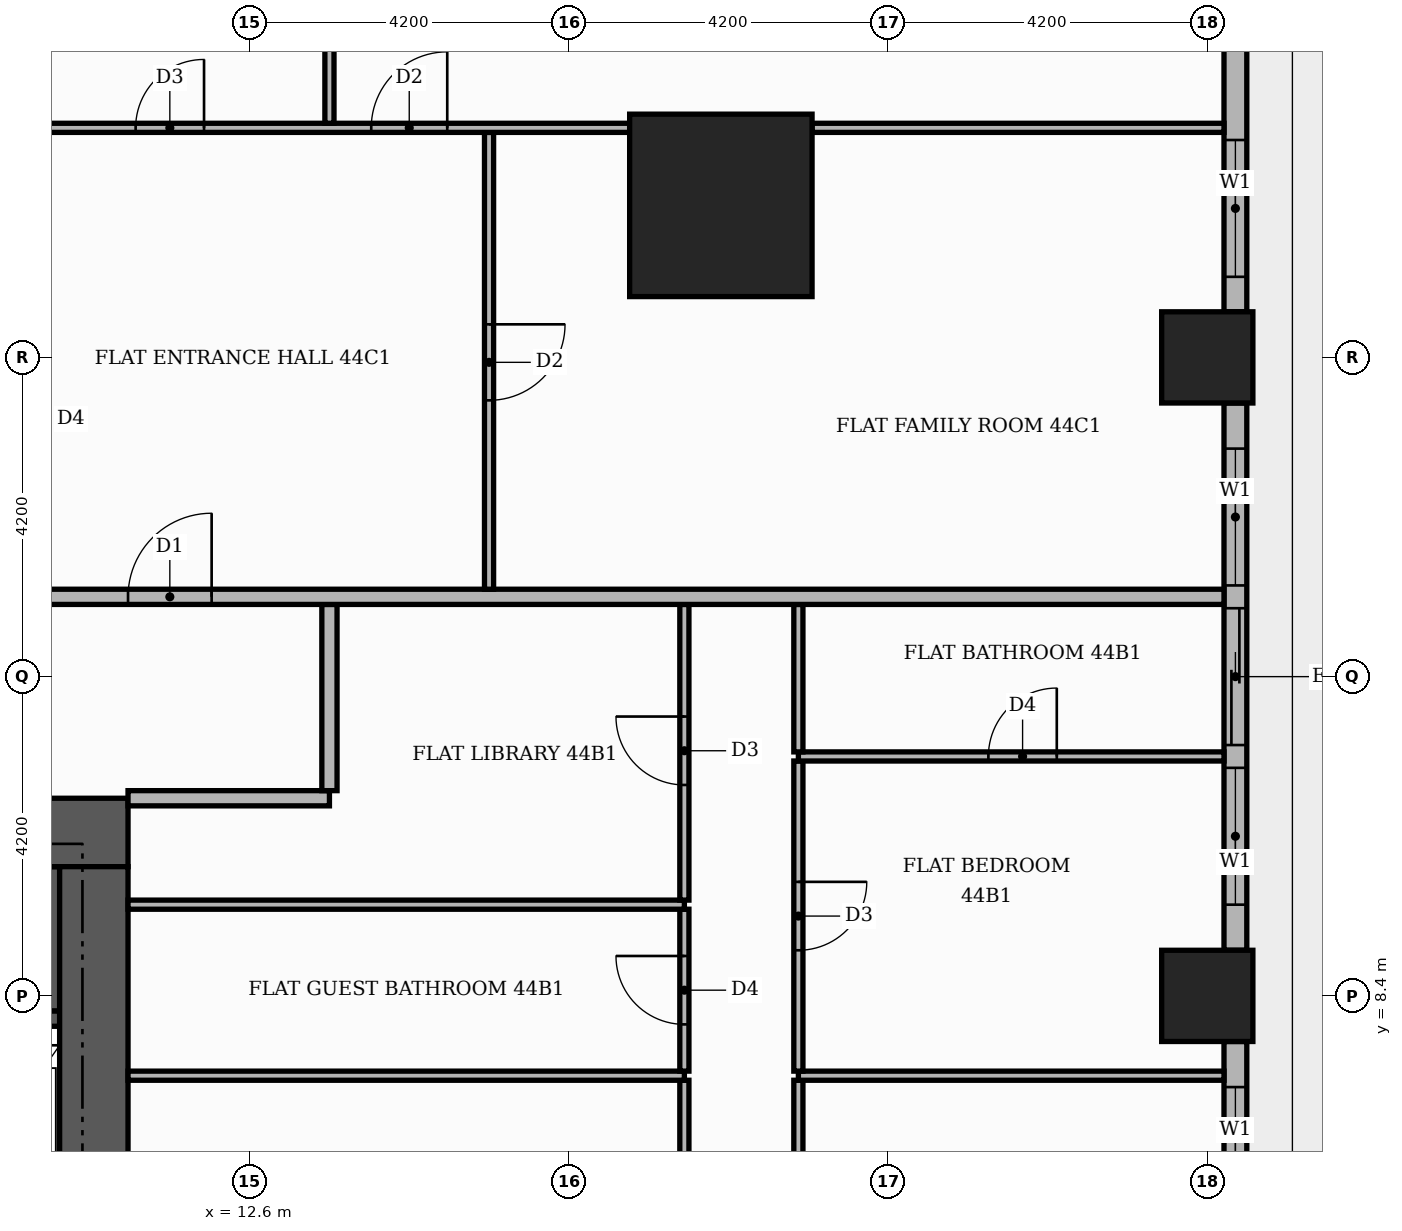
"""IFC4 building model, lengths in metres.
Left out: names, types, materials, properties, quantities, classifications, styles, units other than length and angle.
Written with IfcOpenShell. Run it as: python <this file> out.ifc"""

import sys

from ifc_helpers import new_model, si_unit, direction, frame, frame_2d, origin, origin_2d, place, context, subcontext, project, spatial, rectangle, extrude, element, fill, save


model = new_model("IFC4")
c1 = context("Model", 3, precision=1e-05, world=origin(), true_north=direction((0.0, 1.0)))
c2 = subcontext(c1, "Body", "Model", "MODEL_VIEW")
j1 = project(units=[si_unit("LENGTHUNIT", "METRE"), si_unit("PLANEANGLEUNIT", "RADIAN")], contexts=[c1])
p1 = place(None, origin())
s1 = spatial("IfcSite", under=j1, at=p1, CompositionType="ELEMENT")
p2 = place(p1, origin())
s2 = spatial("IfcBuilding", under=s1, at=p2, CompositionType="ELEMENT")
p3 = place(p2, frame((0.0, 0.0, 188.4)))
s3 = spatial("IfcBuildingStorey", under=s2, at=p3, CompositionType="ELEMENT", Elevation=188.4)
p4 = place(p3, frame((5.5, 9.15, 0.0), z_axis=(0.0, 0.0, 1.0), x_axis=(1.0, 0.0, 0.0)))
e1 = element("IfcWall", 1, at=p4, inside=s3, PredefinedType="SHEAR", context=c2, shape_type="SweptSolid", body=[
    extrude(rectangle(XDim=4.6, YDim=1.9, at=frame_2d((2.3, 0.0))), origin(), (0.0, 0.0, 1.0), 3.48),
])
p5 = place(p3, frame((8.1, 8.1, 0.0), z_axis=(0.0, 0.0, 1.0), x_axis=(1.0, 0.0, 0.0)))
e2 = element("IfcWall", 2, at=p5, inside=s3, PredefinedType="SHEAR", context=c2, shape_type="SweptSolid", body=[
    extrude(rectangle(XDim=2.0, YDim=0.2, at=frame_2d((1.0, 0.0))), origin(), (0.0, 0.0, 1.0), 3.48),
])
p6 = place(p3, frame((-11.0, 10.55, 0.0), z_axis=(0.0, 0.0, 1.0), x_axis=(1.0, 0.0, 0.0)))
e3 = element("IfcWall", 3, at=p6, inside=s3, PredefinedType="SHEAR", context=c2, shape_type="SweptSolid", body=[
    extrude(rectangle(XDim=22.0, YDim=0.9, at=frame_2d((11.0, 0.0))), origin(), (0.0, 0.0, 1.0), 3.48),
])
p7 = place(p6, frame((13.3, 0.0, 0.0)))
e4 = element("IfcOpeningElement", 4, at=p7, cuts=e3, PredefinedType="OPENING", context=c2, shape_type="SweptSolid", body=[
    extrude(rectangle(XDim=1.8, YDim=2.2, at=frame_2d((0.9, 1.1))), frame((0.0, 0.46, 0.0), z_axis=(0.0, -1.0, 0.0), x_axis=(1.0, 0.0, 0.0)), (0.0, 0.0, 1.0), 0.92),
])
p8 = place(p3, frame((10.55, -10.1, 0.0), z_axis=(0.0, 0.0, 1.0), x_axis=(0.0, 1.0, 0.0)))
e5 = element("IfcWall", 5, at=p8, inside=s3, PredefinedType="SHEAR", context=c2, shape_type="SweptSolid", body=[
    extrude(rectangle(XDim=20.2, YDim=0.9, at=frame_2d((10.1, 0.0))), origin(), (0.0, 0.0, 1.0), 3.48),
])
p9 = place(p3, frame((18.8, 18.8, 0.0), z_axis=(0.0, 0.0, 1.0), x_axis=(1.0, 0.0, 0.0)))
e6 = element("IfcColumn", 6, at=p9, inside=s3, PredefinedType="COLUMN", context=c2, shape_type="SweptSolid", body=[
    extrude(rectangle(XDim=2.4, YDim=2.4, at=origin_2d()), origin(), (0.0, 0.0, 1.0), 3.9),
])
for number, where, z_axis, x_axis in (
    (7, (25.2, 8.4, 0.0), (0.0, 0.0, 1.0), (1.0, 0.0, 0.0)),
    (8, (25.2, 16.8, 0.0), (0.0, 0.0, 1.0), (1.0, 0.0, 0.0)),
):
    element("IfcColumn", number, at=place(p3, frame(where, z_axis=z_axis, x_axis=x_axis)), inside=s3, PredefinedType="COLUMN", context=c2, shape_type="SweptSolid", body=[
        extrude(rectangle(XDim=1.2, YDim=1.2, at=origin_2d()), origin(), (0.0, 0.0, 1.0), 3.9),
    ])
p10 = place(p3, frame((25.57, 3.45, 0.0), z_axis=(0.0, 0.0, 1.0), x_axis=(0.0, 1.0, 0.0)))
e9 = element("IfcWall", 9, at=p10, inside=s3, PredefinedType="STANDARD", context=c2, shape_type="SweptSolid", body=[
    extrude(rectangle(XDim=4.35, YDim=0.3, at=frame_2d((2.175, 0.0))), origin(), (0.0, 0.0, 1.0), 3.48),
])
p11 = place(p10, frame((1.95, 0.0, 0.9)))
e10 = element("IfcOpeningElement", 10, at=p11, cuts=e9, PredefinedType="OPENING", context=c2, shape_type="SweptSolid", body=[
    extrude(rectangle(XDim=1.8, YDim=2.1, at=frame_2d((0.9, 1.05))), frame((0.0, 0.16, 0.0), z_axis=(0.0, -1.0, 0.0), x_axis=(1.0, 0.0, 0.0)), (0.0, 0.0, 1.0), 0.32),
])
p12 = place(p3, frame((25.57, 9.0, 0.0), z_axis=(0.0, 0.0, 1.0), x_axis=(0.0, 1.0, 0.0)))
e11 = element("IfcWall", 11, at=p12, inside=s3, PredefinedType="STANDARD", context=c2, shape_type="SweptSolid", body=[
    extrude(rectangle(XDim=7.2, YDim=0.3, at=frame_2d((3.6, 0.0))), origin(), (0.0, 0.0, 1.0), 3.48),
])
p13 = place(p12, frame((0.6, 0.0, 0.9)))
e12 = element("IfcOpeningElement", 12, at=p13, cuts=e11, PredefinedType="OPENING", context=c2, shape_type="SweptSolid", body=[
    extrude(rectangle(XDim=1.8, YDim=2.1, at=frame_2d((0.9, 1.05))), frame((0.0, 0.16, 0.0), z_axis=(0.0, -1.0, 0.0), x_axis=(1.0, 0.0, 0.0)), (0.0, 0.0, 1.0), 0.32),
])
p14 = place(p12, frame((2.7, 0.0, 0.0)))
e13 = element("IfcOpeningElement", 13, at=p14, cuts=e11, PredefinedType="OPENING", context=c2, shape_type="SweptSolid", body=[
    extrude(rectangle(XDim=1.8, YDim=2.4, at=frame_2d((0.9, 1.2))), frame((0.0, 0.16, 0.0), z_axis=(0.0, -1.0, 0.0), x_axis=(1.0, 0.0, 0.0)), (0.0, 0.0, 1.0), 0.32),
])
p15 = place(p12, frame((4.8, 0.0, 0.9)))
e14 = element("IfcOpeningElement", 14, at=p15, cuts=e11, PredefinedType="OPENING", context=c2, shape_type="SweptSolid", body=[
    extrude(rectangle(XDim=1.8, YDim=2.1, at=frame_2d((0.9, 1.05))), frame((0.0, 0.16, 0.0), z_axis=(0.0, -1.0, 0.0), x_axis=(1.0, 0.0, 0.0)), (0.0, 0.0, 1.0), 0.32),
])
p16 = place(p3, frame((25.57, 17.4, 0.0), z_axis=(0.0, 0.0, 1.0), x_axis=(0.0, 1.0, 0.0)))
e15 = element("IfcWall", 15, at=p16, inside=s3, PredefinedType="STANDARD", context=c2, shape_type="SweptSolid", body=[
    extrude(rectangle(XDim=3.82, YDim=0.3, at=frame_2d((1.91, 0.0))), origin(), (0.0, 0.0, 1.0), 3.48),
])
p17 = place(p16, frame((0.46, 0.0, 0.9)))
e16 = element("IfcOpeningElement", 16, at=p17, cuts=e15, PredefinedType="OPENING", context=c2, shape_type="SweptSolid", body=[
    extrude(rectangle(XDim=1.8, YDim=2.1, at=frame_2d((0.9, 1.05))), frame((0.0, 0.16, 0.0), z_axis=(0.0, -1.0, 0.0), x_axis=(1.0, 0.0, 0.0)), (0.0, 0.0, 1.0), 0.32),
])
p18 = place(p3, frame((18.32, 3.21, 0.0), z_axis=(0.0, 0.0, 1.0), x_axis=(0.0, 1.0, 0.0)))
e17 = element("IfcWall", 17, at=p18, inside=s3, PredefinedType="PARTITIONING", context=c2, shape_type="SweptSolid", body=[
    extrude(rectangle(XDim=4.08, YDim=0.12, at=frame_2d((2.04, 0.0))), origin(), (0.0, 0.0, 1.0), 3.48),
])
p19 = place(p18, frame((1.59, 0.0, 0.0)))
e18 = element("IfcOpeningElement", 18, at=p19, cuts=e17, PredefinedType="OPENING", context=c2, shape_type="SweptSolid", body=[
    extrude(rectangle(XDim=0.9, YDim=2.1, at=frame_2d((0.45, 1.05))), frame((0.0, 0.07, 0.0), z_axis=(0.0, -1.0, 0.0), x_axis=(1.0, 0.0, 0.0)), (0.0, 0.0, 1.0), 0.14),
])
p20 = place(p3, frame((19.82, 3.21, 0.0), z_axis=(0.0, 0.0, 1.0), x_axis=(0.0, 1.0, 0.0)))
e19 = element("IfcWall", 19, at=p20, inside=s3, PredefinedType="PARTITIONING", context=c2, shape_type="SweptSolid", body=[
    extrude(rectangle(XDim=4.08, YDim=0.12, at=frame_2d((2.04, 0.0))), origin(), (0.0, 0.0, 1.0), 3.48),
])
p21 = place(p20, frame((1.59, 0.0, 0.0)))
e20 = element("IfcOpeningElement", 20, at=p21, cuts=e19, PredefinedType="OPENING", context=c2, shape_type="SweptSolid", body=[
    extrude(rectangle(XDim=0.9, YDim=2.1, at=frame_2d((0.45, 1.05))), frame((0.0, 0.07, 0.0), z_axis=(0.0, -1.0, 0.0), x_axis=(1.0, 0.0, 0.0)), (0.0, 0.0, 1.0), 0.14),
])
p22 = place(p3, frame((11.0, 7.35, 0.0), z_axis=(0.0, 0.0, 1.0), x_axis=(1.0, 0.0, 0.0)))
e21 = element("IfcWall", 21, at=p22, inside=s3, PredefinedType="PARTITIONING", context=c2, shape_type="SweptSolid", body=[
    extrude(rectangle(XDim=7.32, YDim=0.12, at=frame_2d((3.66, 0.0))), origin(), (0.0, 0.0, 1.0), 3.48),
])
p23 = place(p3, frame((19.82, 7.35, 0.0), z_axis=(0.0, 0.0, 1.0), x_axis=(1.0, 0.0, 0.0)))
e22 = element("IfcWall", 22, at=p23, inside=s3, PredefinedType="PARTITIONING", context=c2, shape_type="SweptSolid", body=[
    extrude(rectangle(XDim=5.6, YDim=0.12, at=frame_2d((2.8, 0.0))), origin(), (0.0, 0.0, 1.0), 3.48),
])
p24 = place(p3, frame((18.32, 7.41, 0.0), z_axis=(0.0, 0.0, 1.0), x_axis=(0.0, 1.0, 0.0)))
e23 = element("IfcWall", 23, at=p24, inside=s3, PredefinedType="PARTITIONING", context=c2, shape_type="SweptSolid", body=[
    extrude(rectangle(XDim=2.13, YDim=0.12, at=frame_2d((1.065, 0.0))), origin(), (0.0, 0.0, 1.0), 3.48),
])
p25 = place(p24, frame((0.615, 0.0, 0.0)))
e24 = element("IfcOpeningElement", 24, at=p25, cuts=e23, PredefinedType="OPENING", context=c2, shape_type="SweptSolid", body=[
    extrude(rectangle(XDim=0.9, YDim=2.1, at=frame_2d((0.45, 1.05))), frame((0.0, 0.07, 0.0), z_axis=(0.0, -1.0, 0.0), x_axis=(1.0, 0.0, 0.0)), (0.0, 0.0, 1.0), 0.14),
])
p26 = place(p3, frame((19.82, 7.41, 0.0), z_axis=(0.0, 0.0, 1.0), x_axis=(0.0, 1.0, 0.0)))
e25 = element("IfcWall", 25, at=p26, inside=s3, PredefinedType="PARTITIONING", context=c2, shape_type="SweptSolid", body=[
    extrude(rectangle(XDim=4.08, YDim=0.12, at=frame_2d((2.04, 0.0))), origin(), (0.0, 0.0, 1.0), 3.48),
])
p27 = place(p26, frame((1.59, 0.0, 0.0)))
e26 = element("IfcOpeningElement", 26, at=p27, cuts=e25, PredefinedType="OPENING", context=c2, shape_type="SweptSolid", body=[
    extrude(rectangle(XDim=0.9, YDim=2.1, at=frame_2d((0.45, 1.05))), frame((0.0, 0.07, 0.0), z_axis=(0.0, -1.0, 0.0), x_axis=(1.0, 0.0, 0.0)), (0.0, 0.0, 1.0), 0.14),
])
p28 = place(p3, frame((11.0, 9.6, 0.0), z_axis=(0.0, 0.0, 1.0), x_axis=(1.0, 0.0, 0.0)))
e27 = element("IfcWall", 27, at=p28, inside=s3, PredefinedType="PARTITIONING", context=c2, shape_type="SweptSolid", body=[
    extrude(rectangle(XDim=7.32, YDim=0.12, at=frame_2d((3.66, 0.0))), origin(), (0.0, 0.0, 1.0), 3.48),
])
p29 = place(p3, frame((18.32, 9.66, 0.0), z_axis=(0.0, 0.0, 1.0), x_axis=(0.0, 1.0, 0.0)))
e28 = element("IfcWall", 28, at=p29, inside=s3, PredefinedType="PARTITIONING", context=c2, shape_type="SweptSolid", body=[
    extrude(rectangle(XDim=3.89, YDim=0.12, at=frame_2d((1.945, 0.0))), origin(), (0.0, 0.0, 1.0), 3.48),
])
p30 = place(p29, frame((1.515, 0.0, 0.0)))
e29 = element("IfcOpeningElement", 29, at=p30, cuts=e28, PredefinedType="OPENING", context=c2, shape_type="SweptSolid", body=[
    extrude(rectangle(XDim=0.9, YDim=2.1, at=frame_2d((0.45, 1.05))), frame((0.0, 0.07, 0.0), z_axis=(0.0, -1.0, 0.0), x_axis=(1.0, 0.0, 0.0)), (0.0, 0.0, 1.0), 0.14),
])
p31 = place(p3, frame((11.0, 11.0, 0.0), z_axis=(0.0, 0.0, 1.0), x_axis=(1.0, 0.0, 0.0)))
e30 = element("IfcWall", 30, at=p31, inside=s3, PredefinedType="PARTITIONING", context=c2, shape_type="SweptSolid", body=[
    extrude(rectangle(XDim=2.65, YDim=0.2, at=frame_2d((1.325, 0.0))), origin(), (0.0, 0.0, 1.0), 3.48),
])
p32 = place(p3, frame((13.65, 11.1, 0.0), z_axis=(0.0, 0.0, 1.0), x_axis=(0.0, 1.0, 0.0)))
e31 = element("IfcWall", 31, at=p32, inside=s3, PredefinedType="PARTITIONING", context=c2, shape_type="SweptSolid", body=[
    extrude(rectangle(XDim=2.45, YDim=0.2, at=frame_2d((1.225, 0.0))), origin(), (0.0, 0.0, 1.0), 3.48),
])
p33 = place(p3, frame((19.82, 11.55, 0.0), z_axis=(0.0, 0.0, 1.0), x_axis=(1.0, 0.0, 0.0)))
e32 = element("IfcWall", 32, at=p33, inside=s3, PredefinedType="PARTITIONING", context=c2, shape_type="SweptSolid", body=[
    extrude(rectangle(XDim=5.6, YDim=0.12, at=frame_2d((2.8, 0.0))), origin(), (0.0, 0.0, 1.0), 3.48),
])
p34 = place(p33, frame((2.5, 0.0, 0.0)))
e33 = element("IfcOpeningElement", 33, at=p34, cuts=e32, PredefinedType="OPENING", context=c2, shape_type="SweptSolid", body=[
    extrude(rectangle(XDim=0.9, YDim=2.1, at=frame_2d((0.45, 1.05))), frame((0.0, 0.07, 0.0), z_axis=(0.0, -1.0, 0.0), x_axis=(1.0, 0.0, 0.0)), (0.0, 0.0, 1.0), 0.14),
])
p35 = place(p3, frame((19.82, 11.61, 0.0), z_axis=(0.0, 0.0, 1.0), x_axis=(0.0, 1.0, 0.0)))
e34 = element("IfcWall", 34, at=p35, inside=s3, PredefinedType="PARTITIONING", context=c2, shape_type="SweptSolid", body=[
    extrude(rectangle(XDim=1.94, YDim=0.12, at=frame_2d((0.97, 0.0))), origin(), (0.0, 0.0, 1.0), 3.48),
])
p36 = place(p3, frame((-13.65, 13.65, 0.0), z_axis=(0.0, 0.0, 1.0), x_axis=(1.0, 0.0, 0.0)))
e35 = element("IfcWall", 35, at=p36, inside=s3, PredefinedType="PARTITIONING", context=c2, shape_type="SweptSolid", body=[
    extrude(rectangle(XDim=39.07, YDim=0.2, at=frame_2d((19.535, 0.0))), origin(), (0.0, 0.0, 1.0), 3.48),
])
p37 = place(p36, frame((24.65, 0.0, 0.0)))
e36 = element("IfcOpeningElement", 36, at=p37, cuts=e35, PredefinedType="OPENING", context=c2, shape_type="SweptSolid", body=[
    extrude(rectangle(XDim=1.1, YDim=2.4, at=frame_2d((0.55, 1.2))), frame((0.0, 0.11, 0.0), z_axis=(0.0, -1.0, 0.0), x_axis=(1.0, 0.0, 0.0)), (0.0, 0.0, 1.0), 0.22),
])
p38 = place(p36, frame((12.05, 0.0, 0.0)))
e37 = element("IfcOpeningElement", 37, at=p38, cuts=e35, PredefinedType="OPENING", context=c2, shape_type="SweptSolid", body=[
    extrude(rectangle(XDim=1.1, YDim=2.4, at=frame_2d((0.55, 1.2))), frame((0.0, 0.11, 0.0), z_axis=(0.0, -1.0, 0.0), x_axis=(1.0, 0.0, 0.0)), (0.0, 0.0, 1.0), 0.22),
])
p39 = place(p3, frame((15.75, 13.75, 0.0), z_axis=(0.0, 0.0, 1.0), x_axis=(0.0, 1.0, 0.0)))
e38 = element("IfcWall", 38, at=p39, inside=s3, PredefinedType="PARTITIONING", context=c2, shape_type="SweptSolid", body=[
    extrude(rectangle(XDim=6.01, YDim=0.12, at=frame_2d((3.005, 0.0))), origin(), (0.0, 0.0, 1.0), 3.48),
])
p40 = place(p39, frame((2.485, 0.0, 0.0)))
e39 = element("IfcOpeningElement", 39, at=p40, cuts=e38, PredefinedType="OPENING", context=c2, shape_type="SweptSolid", body=[
    extrude(rectangle(XDim=1.0, YDim=2.1, at=frame_2d((0.5, 1.05))), frame((0.0, 0.07, 0.0), z_axis=(0.0, -1.0, 0.0), x_axis=(1.0, 0.0, 0.0)), (0.0, 0.0, 1.0), 0.14),
])
p41 = place(p3, frame((5.35, 19.82, 0.0), z_axis=(0.0, 0.0, 1.0), x_axis=(1.0, 0.0, 0.0)))
e40 = element("IfcWall", 40, at=p41, inside=s3, PredefinedType="PARTITIONING", context=c2, shape_type="SweptSolid", body=[
    extrude(rectangle(XDim=12.25, YDim=0.12, at=frame_2d((6.125, 0.0))), origin(), (0.0, 0.0, 1.0), 3.48),
])
p42 = place(p41, frame((8.85, 0.0, 0.0)))
e41 = element("IfcOpeningElement", 41, at=p42, cuts=e40, PredefinedType="OPENING", context=c2, shape_type="SweptSolid", body=[
    extrude(rectangle(XDim=1.0, YDim=2.1, at=frame_2d((0.5, 1.05))), frame((0.0, 0.07, 0.0), z_axis=(0.0, -1.0, 0.0), x_axis=(1.0, 0.0, 0.0)), (0.0, 0.0, 1.0), 0.14),
])
p43 = place(p41, frame((5.75, 0.0, 0.0)))
e42 = element("IfcOpeningElement", 42, at=p43, cuts=e40, PredefinedType="OPENING", context=c2, shape_type="SweptSolid", body=[
    extrude(rectangle(XDim=0.9, YDim=2.1, at=frame_2d((0.45, 1.05))), frame((0.0, 0.07, 0.0), z_axis=(0.0, -1.0, 0.0), x_axis=(1.0, 0.0, 0.0)), (0.0, 0.0, 1.0), 0.14),
])
p44 = place(p3, frame((20.0, 19.82, 0.0), z_axis=(0.0, 0.0, 1.0), x_axis=(1.0, 0.0, 0.0)))
e43 = element("IfcWall", 43, at=p44, inside=s3, PredefinedType="PARTITIONING", context=c2, shape_type="SweptSolid", body=[
    extrude(rectangle(XDim=5.42, YDim=0.12, at=frame_2d((2.71, 0.0))), origin(), (0.0, 0.0, 1.0), 3.48),
])
p45 = place(p3, frame((13.65, 19.88, 0.0), z_axis=(0.0, 0.0, 1.0), x_axis=(0.0, 1.0, 0.0)))
e44 = element("IfcWall", 44, at=p45, inside=s3, PredefinedType="PARTITIONING", context=c2, shape_type="SweptSolid", body=[
    extrude(rectangle(XDim=5.54, YDim=0.12, at=frame_2d((2.77, 0.0))), origin(), (0.0, 0.0, 1.0), 3.48),
])
p46 = place(p11, origin())
e45 = element("IfcWindow", 45, at=p46, inside=s3, PartitioningType="SINGLE_PANEL", PredefinedType="WINDOW", context=c2, shape_type="SweptSolid", body=[
    extrude(rectangle(XDim=1.8, YDim=2.1, at=frame_2d((0.9, 1.05))), frame((0.0, 0.03, 0.0), z_axis=(0.0, -1.0, 0.0), x_axis=(1.0, 0.0, 0.0)), (0.0, 0.0, 1.0), 0.06),
])
fill(e10, e45)
p47 = place(p13, origin())
e46 = element("IfcWindow", 46, at=p47, inside=s3, PartitioningType="SINGLE_PANEL", PredefinedType="WINDOW", context=c2, shape_type="SweptSolid", body=[
    extrude(rectangle(XDim=1.8, YDim=2.1, at=frame_2d((0.9, 1.05))), frame((0.0, 0.03, 0.0), z_axis=(0.0, -1.0, 0.0), x_axis=(1.0, 0.0, 0.0)), (0.0, 0.0, 1.0), 0.06),
])
fill(e12, e46)
p48 = place(p14, origin())
e47 = element("IfcDoor", 47, at=p48, inside=s3, OperationType="SLIDING_TO_RIGHT", PredefinedType="DOOR", context=c2, shape_type="SweptSolid", body=[
    extrude(rectangle(XDim=1.8, YDim=2.4, at=frame_2d((0.9, 1.2))), frame((0.0, 0.025, 0.0), z_axis=(0.0, -1.0, 0.0), x_axis=(1.0, 0.0, 0.0)), (0.0, 0.0, 1.0), 0.05),
])
fill(e13, e47)
p49 = place(p15, origin())
e48 = element("IfcWindow", 48, at=p49, inside=s3, PartitioningType="SINGLE_PANEL", PredefinedType="WINDOW", context=c2, shape_type="SweptSolid", body=[
    extrude(rectangle(XDim=1.8, YDim=2.1, at=frame_2d((0.9, 1.05))), frame((0.0, 0.03, 0.0), z_axis=(0.0, -1.0, 0.0), x_axis=(1.0, 0.0, 0.0)), (0.0, 0.0, 1.0), 0.06),
])
fill(e14, e48)
p50 = place(p17, origin())
e49 = element("IfcWindow", 49, at=p50, inside=s3, PartitioningType="SINGLE_PANEL", PredefinedType="WINDOW", context=c2, shape_type="SweptSolid", body=[
    extrude(rectangle(XDim=1.8, YDim=2.1, at=frame_2d((0.9, 1.05))), frame((0.0, 0.03, 0.0), z_axis=(0.0, -1.0, 0.0), x_axis=(1.0, 0.0, 0.0)), (0.0, 0.0, 1.0), 0.06),
])
fill(e16, e49)
p51 = place(p25, origin())
e50 = element("IfcDoor", 50, at=p51, inside=s3, OperationType="SINGLE_SWING_RIGHT", PredefinedType="DOOR", context=c2, shape_type="SweptSolid", body=[
    extrude(rectangle(XDim=0.9, YDim=2.1, at=frame_2d((0.45, 1.05))), frame((0.0, 0.025, 0.0), z_axis=(0.0, -1.0, 0.0), x_axis=(1.0, 0.0, 0.0)), (0.0, 0.0, 1.0), 0.05),
])
fill(e24, e50)
p52 = place(p30, origin())
e51 = element("IfcDoor", 51, at=p52, inside=s3, OperationType="SINGLE_SWING_RIGHT", PredefinedType="DOOR", context=c2, shape_type="SweptSolid", body=[
    extrude(rectangle(XDim=0.9, YDim=2.1, at=frame_2d((0.45, 1.05))), frame((0.0, 0.025, 0.0), z_axis=(0.0, -1.0, 0.0), x_axis=(1.0, 0.0, 0.0)), (0.0, 0.0, 1.0), 0.05),
])
fill(e29, e51)
p53 = place(p27, frame((0.9, 0.0, 0.0), z_axis=(0.0, 0.0, 1.0), x_axis=(-1.0, 0.0, 0.0)))
e52 = element("IfcDoor", 52, at=p53, inside=s3, OperationType="SINGLE_SWING_RIGHT", PredefinedType="DOOR", context=c2, shape_type="SweptSolid", body=[
    extrude(rectangle(XDim=0.9, YDim=2.1, at=frame_2d((0.45, 1.05))), frame((0.0, 0.025, 0.0), z_axis=(0.0, -1.0, 0.0), x_axis=(1.0, 0.0, 0.0)), (0.0, 0.0, 1.0), 0.05),
])
fill(e26, e52)
p54 = place(p34, origin())
e53 = element("IfcDoor", 53, at=p54, inside=s3, OperationType="SINGLE_SWING_RIGHT", PredefinedType="DOOR", context=c2, shape_type="SweptSolid", body=[
    extrude(rectangle(XDim=0.9, YDim=2.1, at=frame_2d((0.45, 1.05))), frame((0.0, 0.025, 0.0), z_axis=(0.0, -1.0, 0.0), x_axis=(1.0, 0.0, 0.0)), (0.0, 0.0, 1.0), 0.05),
])
fill(e33, e53)
p55 = place(p37, origin())
e54 = element("IfcDoor", 54, at=p55, inside=s3, OperationType="SINGLE_SWING_RIGHT", PredefinedType="DOOR", context=c2, shape_type="SweptSolid", body=[
    extrude(rectangle(XDim=1.1, YDim=2.4, at=frame_2d((0.55, 1.2))), frame((0.0, 0.025, 0.0), z_axis=(0.0, -1.0, 0.0), x_axis=(1.0, 0.0, 0.0)), (0.0, 0.0, 1.0), 0.05),
])
fill(e36, e54)
p56 = place(p40, frame((1.0, 0.0, 0.0), z_axis=(0.0, 0.0, 1.0), x_axis=(-1.0, 0.0, 0.0)))
e55 = element("IfcDoor", 55, at=p56, inside=s3, OperationType="SINGLE_SWING_RIGHT", PredefinedType="DOOR", context=c2, shape_type="SweptSolid", body=[
    extrude(rectangle(XDim=1.0, YDim=2.1, at=frame_2d((0.5, 1.05))), frame((0.0, 0.025, 0.0), z_axis=(0.0, -1.0, 0.0), x_axis=(1.0, 0.0, 0.0)), (0.0, 0.0, 1.0), 0.05),
])
fill(e39, e55)
p57 = place(p42, origin())
e56 = element("IfcDoor", 56, at=p57, inside=s3, OperationType="SINGLE_SWING_RIGHT", PredefinedType="DOOR", context=c2, shape_type="SweptSolid", body=[
    extrude(rectangle(XDim=1.0, YDim=2.1, at=frame_2d((0.5, 1.05))), frame((0.0, 0.025, 0.0), z_axis=(0.0, -1.0, 0.0), x_axis=(1.0, 0.0, 0.0)), (0.0, 0.0, 1.0), 0.05),
])
fill(e41, e56)
p58 = place(p43, origin())
e57 = element("IfcDoor", 57, at=p58, inside=s3, OperationType="SINGLE_SWING_RIGHT", PredefinedType="DOOR", context=c2, shape_type="SweptSolid", body=[
    extrude(rectangle(XDim=0.9, YDim=2.1, at=frame_2d((0.45, 1.05))), frame((0.0, 0.025, 0.0), z_axis=(0.0, -1.0, 0.0), x_axis=(1.0, 0.0, 0.0)), (0.0, 0.0, 1.0), 0.05),
])
fill(e42, e57)
save(model, sys.argv[1])
